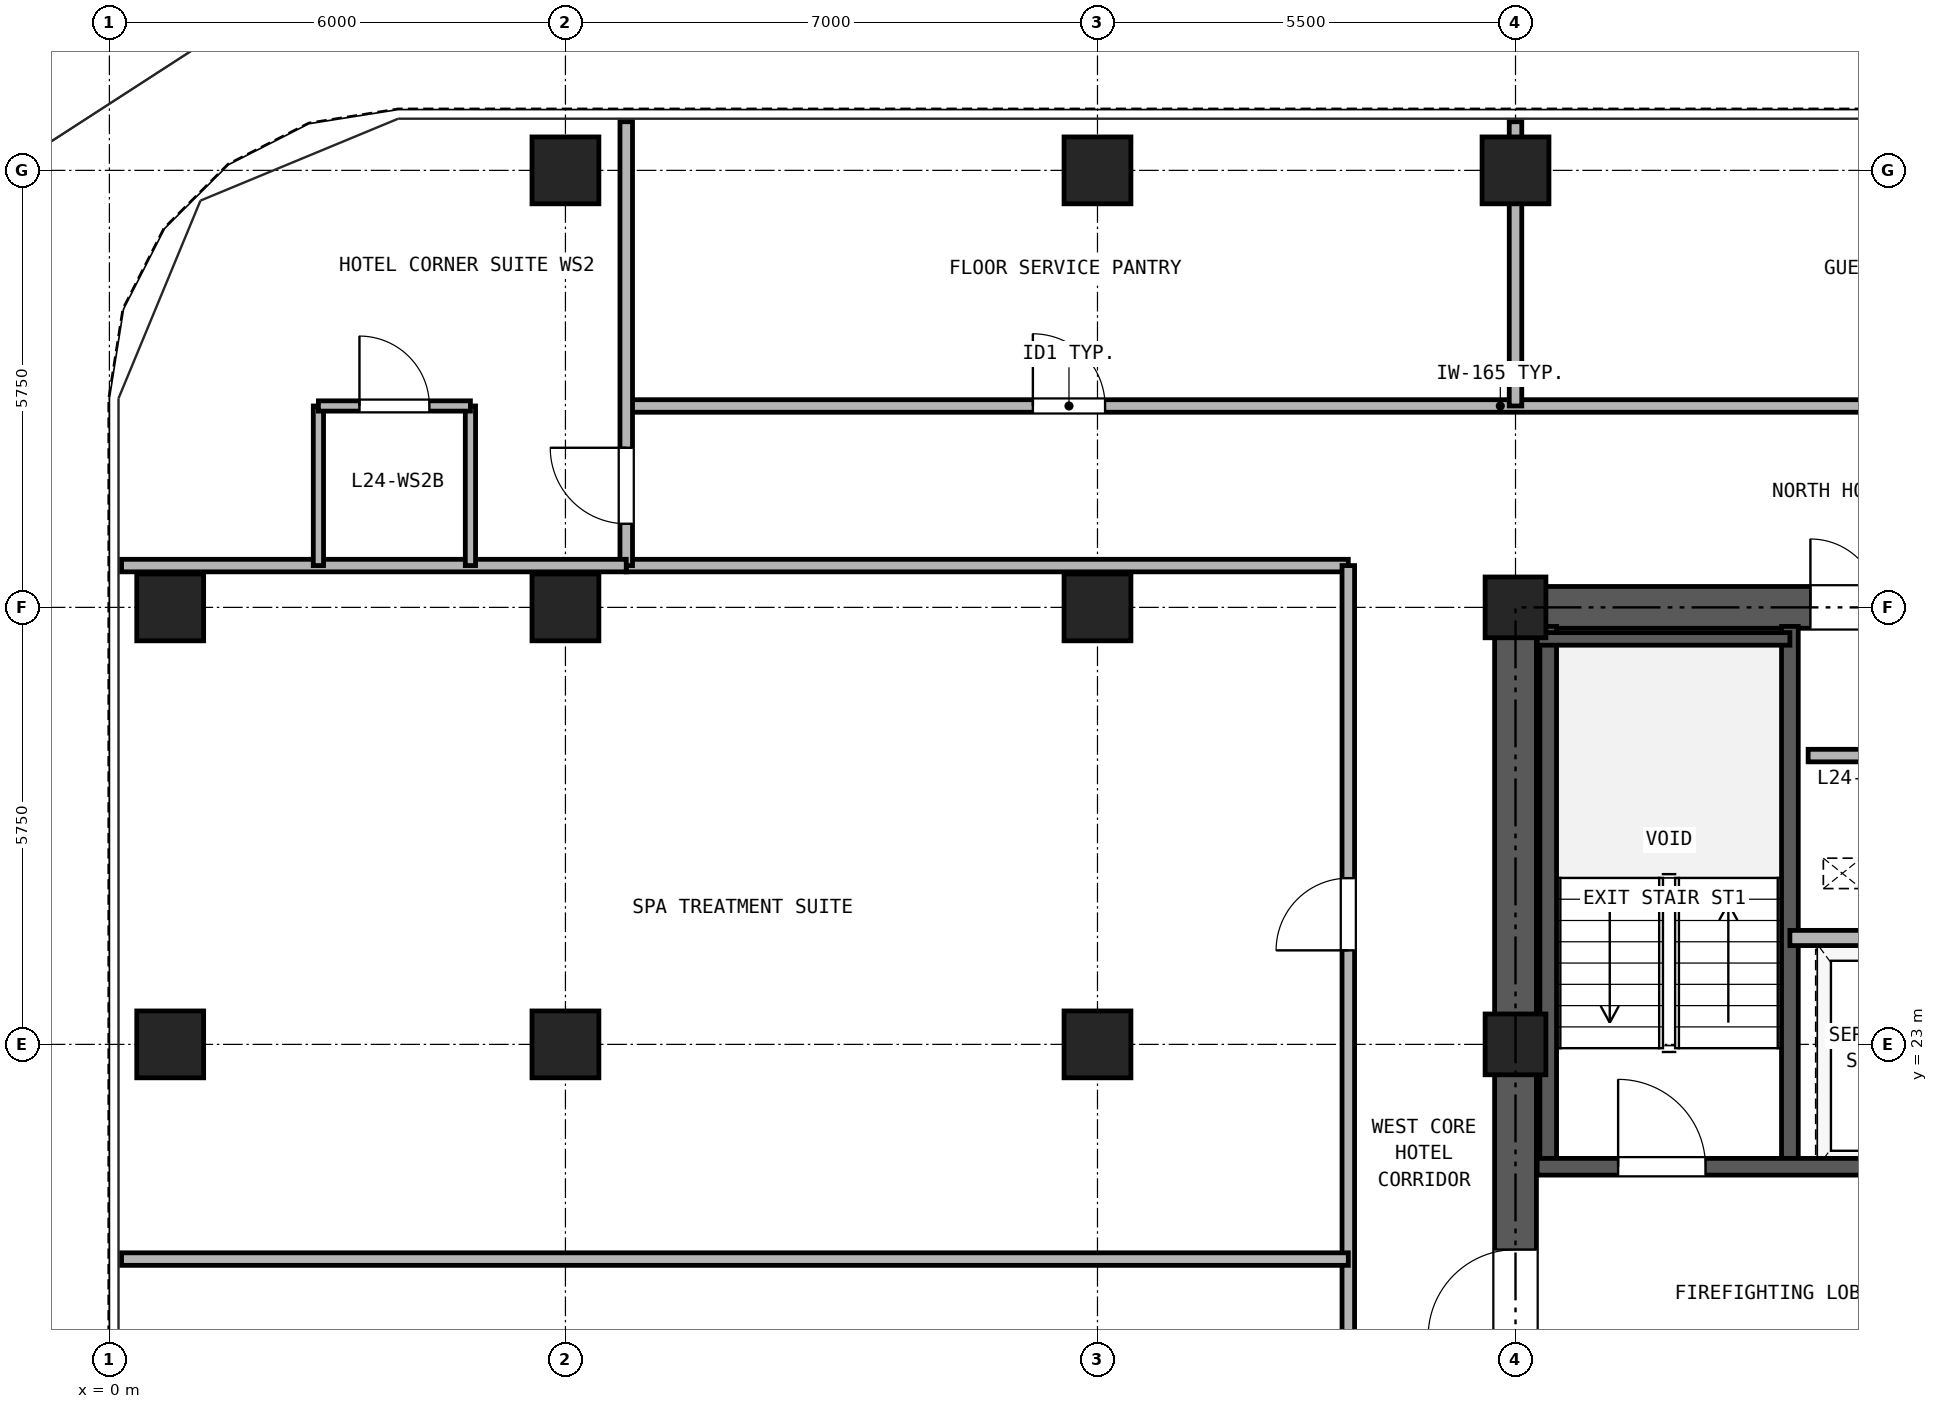
"""IFC4 building model, lengths in metres.
Left out: names, types, materials, properties, quantities, classifications, styles, units other than length and angle.
Written with IfcOpenShell. Run it as: python <this file> out.ifc"""

import sys

from ifc_helpers import new_model, si_unit, direction, frame, frame_2d, origin, origin_2d, place, context, subcontext, project, spatial, rectangle, hollow_rectangle, extrude, source, transform, mapped, element, fill, save


model = new_model("IFC4")
c1 = context("Model", 3, precision=1e-05, world=origin(), true_north=direction((0.0, 1.0)))
c2 = subcontext(c1, "Body", "Model", "MODEL_VIEW")
j1 = project(units=[si_unit("LENGTHUNIT", "METRE"), si_unit("PLANEANGLEUNIT", "RADIAN")], contexts=[c1])
p1 = place(None, origin())
s1 = spatial("IfcSite", under=j1, at=p1, CompositionType="ELEMENT")
p2 = place(p1, origin())
s2 = spatial("IfcBuilding", under=s1, at=p2, CompositionType="ELEMENT")
p3 = place(p2, frame((0.0, 0.0, 92.7)))
s3 = spatial("IfcBuildingStorey", under=s2, at=p3, CompositionType="ELEMENT", Elevation=92.7)
m1 = source(origin(), c2, "Body", "SweptSolid", [
    extrude(hollow_rectangle(XDim=0.88, YDim=0.88, WallThickness=0.05, at=origin_2d()), origin(), (0.0, 0.0, 1.0), 2.95),
])
for number, where, z_axis, x_axis in (
    (1, (6.0, 34.5, 0.0), (0.0, 0.0, 1.0), (1.0, 0.0, 0.0)),
    (2, (13.0, 34.5, 0.0), (0.0, 0.0, 1.0), (1.0, 0.0, 0.0)),
    (3, (18.5, 34.5, 0.0), (0.0, 0.0, 1.0), (1.0, 0.0, 0.0)),
    (4, (0.8, 23.0, 0.0), (0.0, 0.0, 1.0), (1.0, 0.0, 0.0)),
    (5, (0.8, 28.75, 0.0), (0.0, 0.0, 1.0), (1.0, 0.0, 0.0)),
    (6, (6.0, 23.0, 0.0), (0.0, 0.0, 1.0), (1.0, 0.0, 0.0)),
    (7, (6.0, 28.75, 0.0), (0.0, 0.0, 1.0), (1.0, 0.0, 0.0)),
    (8, (13.0, 23.0, 0.0), (0.0, 0.0, 1.0), (1.0, 0.0, 0.0)),
    (9, (13.0, 28.75, 0.0), (0.0, 0.0, 1.0), (1.0, 0.0, 0.0)),
):
    element("IfcColumn", number, at=place(p3, frame(where, z_axis=z_axis, x_axis=x_axis)), inside=s3, PredefinedType="COLUMN", context=c2, shape_type="MappedRepresentation", body=[
        mapped(m1, transform((0.0, 0.0, 0.0), x_axis=(1.0, 0.0, 0.0), y_axis=(0.0, 1.0, 0.0), z_axis=(0.0, 0.0, 1.0), scale=1.0)),
    ])
m2 = source(origin(), c2, "Body", "SweptSolid", [
    extrude(hollow_rectangle(XDim=0.8, YDim=0.8, WallThickness=0.045, at=origin_2d()), origin(), (0.0, 0.0, 1.0), 2.95),
])
for number, where, z_axis, x_axis in (
    (10, (18.5, 23.0, 0.0), (0.0, 0.0, 1.0), (1.0, 0.0, 0.0)),
    (11, (18.5, 28.75, 0.0), (0.0, 0.0, 1.0), (1.0, 0.0, 0.0)),
):
    element("IfcColumn", number, at=place(p3, frame(where, z_axis=z_axis, x_axis=x_axis)), inside=s3, PredefinedType="COLUMN", context=c2, shape_type="MappedRepresentation", body=[
        mapped(m2, transform((0.0, 0.0, 0.0), x_axis=(1.0, 0.0, 0.0), y_axis=(0.0, 1.0, 0.0), z_axis=(0.0, 0.0, 1.0), scale=1.0)),
    ])
p4 = place(p3, frame((18.225, 28.75, 0.0), z_axis=(0.0, 0.0, 1.0), x_axis=(1.0, 0.0, 0.0)))
e12 = element("IfcWall", 12, at=p4, inside=s3, PredefinedType="SHEAR", context=c2, shape_type="SweptSolid", body=[
    extrude(rectangle(XDim=10.55, YDim=0.55, at=frame_2d((5.275, 0.0))), origin(), (0.0, 0.0, 1.0), 2.95),
])
p5 = place(p4, frame((4.155, 0.0, 0.0)))
e13 = element("IfcOpeningElement", 13, at=p5, cuts=e12, PredefinedType="OPENING", context=c2, shape_type="SweptSolid", body=[
    extrude(rectangle(XDim=0.9, YDim=2.05, at=frame_2d((0.45, 1.025))), frame((0.0, 0.285, 0.0), z_axis=(0.0, -1.0, 0.0), x_axis=(1.0, 0.0, 0.0)), (0.0, 0.0, 1.0), 0.57),
])
p6 = place(p4, frame((5.695, 0.0, 0.0)))
e14 = element("IfcOpeningElement", 14, at=p6, cuts=e12, PredefinedType="OPENING", context=c2, shape_type="SweptSolid", body=[
    extrude(rectangle(XDim=0.9, YDim=2.05, at=frame_2d((0.45, 1.025))), frame((0.0, 0.285, 0.0), z_axis=(0.0, -1.0, 0.0), x_axis=(1.0, 0.0, 0.0)), (0.0, 0.0, 1.0), 0.57),
])
p7 = place(p3, frame((18.5, 11.775, 0.0), z_axis=(0.0, 0.0, 1.0), x_axis=(0.0, 1.0, 0.0)))
e15 = element("IfcWall", 15, at=p7, inside=s3, PredefinedType="SHEAR", context=c2, shape_type="SweptSolid", body=[
    extrude(rectangle(XDim=16.7, YDim=0.55, at=frame_2d((8.35, 0.0))), origin(), (0.0, 0.0, 1.0), 2.95),
])
p8 = place(p7, frame((7.375, 0.0, 0.0)))
e16 = element("IfcOpeningElement", 16, at=p8, cuts=e15, PredefinedType="OPENING", context=c2, shape_type="SweptSolid", body=[
    extrude(rectangle(XDim=1.15, YDim=2.2, at=frame_2d((0.575, 1.1))), frame((0.0, 0.285, 0.0), z_axis=(0.0, -1.0, 0.0), x_axis=(1.0, 0.0, 0.0)), (0.0, 0.0, 1.0), 0.57),
])
for number, where, z_axis, x_axis in (
    (17, (18.93, 21.39, 0.0), (0.0, 0.0, 1.0), (0.0, 1.0, 0.0)),
    (18, (22.11, 21.39, 0.0), (0.0, 0.0, 1.0), (0.0, 1.0, 0.0)),
):
    element("IfcWall", number, at=place(p3, frame(where, z_axis=z_axis, x_axis=x_axis)), inside=s3, PredefinedType="SOLIDWALL", context=c2, shape_type="SweptSolid", body=[
        extrude(rectangle(XDim=7.11, YDim=0.22, at=frame_2d((3.555, 0.0))), origin(), (0.0, 0.0, 1.0), 2.95),
    ])
p9 = place(p3, frame((18.785, 28.335, 0.0), z_axis=(0.0, 0.0, 1.0), x_axis=(1.0, 0.0, 0.0)))
e19 = element("IfcWall", 19, at=p9, inside=s3, PredefinedType="PARTITIONING", context=c2, shape_type="SweptSolid", body=[
    extrude(rectangle(XDim=3.325, YDim=0.165, at=frame_2d((1.663, 0.0))), origin(), (0.0, 0.0, 1.0), 2.95),
])
p10 = place(p3, frame((18.785, 21.39, 0.0), z_axis=(0.0, 0.0, 1.0), x_axis=(1.0, 0.0, 0.0)))
e20 = element("IfcWall", 20, at=p10, inside=s3, PredefinedType="SOLIDWALL", context=c2, shape_type="SweptSolid", body=[
    extrude(rectangle(XDim=6.345, YDim=0.22, at=frame_2d((3.172, 0.0))), origin(), (0.0, 0.0, 1.0), 2.95),
])
p11 = place(p10, frame((1.065, 0.0, 0.0)))
e21 = element("IfcOpeningElement", 21, at=p11, cuts=e20, PredefinedType="OPENING", context=c2, shape_type="SweptSolid", body=[
    extrude(rectangle(XDim=1.15, YDim=2.2, at=frame_2d((0.575, 1.1))), frame((0.0, 0.12, 0.0), z_axis=(0.0, -1.0, 0.0), x_axis=(1.0, 0.0, 0.0)), (0.0, 0.0, 1.0), 0.24),
])
p12 = place(p10, frame((4.795, 0.0, 0.0)))
e22 = element("IfcOpeningElement", 22, at=p12, cuts=e20, PredefinedType="OPENING", context=c2, shape_type="SweptSolid", body=[
    extrude(rectangle(XDim=1.1, YDim=2.25, at=frame_2d((0.55, 1.125))), frame((0.0, 0.12, 0.0), z_axis=(0.0, -1.0, 0.0), x_axis=(1.0, 0.0, 0.0)), (0.0, 0.0, 1.0), 0.24),
])
p13 = place(p3, frame((22.11, 24.4, 0.0), z_axis=(0.0, 0.0, 1.0), x_axis=(1.0, 0.0, 0.0)))
e23 = element("IfcWall", 23, at=p13, inside=s3, PredefinedType="PARTITIONING", context=c2, shape_type="SweptSolid", body=[
    extrude(rectangle(XDim=3.02, YDim=0.2, at=frame_2d((1.51, 0.0))), origin(), (0.0, 0.0, 1.0), 2.95),
])
p14 = place(p3, frame((6.8, 31.4, 0.0), z_axis=(0.0, 0.0, 1.0), x_axis=(1.0, 0.0, 0.0)))
e24 = element("IfcWall", 24, at=p14, inside=s3, PredefinedType="PARTITIONING", context=c2, shape_type="SweptSolid", body=[
    extrude(rectangle(XDim=33.4, YDim=0.165, at=frame_2d((16.7, 0.0))), origin(), (0.0, 0.0, 1.0), 2.583),
])
p15 = place(p14, frame((5.35, 0.0, 0.0)))
e25 = element("IfcOpeningElement", 25, at=p15, cuts=e24, PredefinedType="OPENING", context=c2, shape_type="SweptSolid", body=[
    extrude(rectangle(XDim=0.95, YDim=2.15, at=frame_2d((0.475, 1.075))), frame((0.0, 0.093, 0.0), z_axis=(0.0, -1.0, 0.0), x_axis=(1.0, 0.0, 0.0)), (0.0, 0.0, 1.0), 0.185),
])
p16 = place(p14, frame((16.7, 0.0, 0.0)))
e26 = element("IfcOpeningElement", 26, at=p16, cuts=e24, PredefinedType="OPENING", context=c2, shape_type="SweptSolid", body=[
    extrude(rectangle(XDim=0.95, YDim=2.15, at=frame_2d((0.475, 1.075))), frame((0.0, 0.093, 0.0), z_axis=(0.0, -1.0, 0.0), x_axis=(1.0, 0.0, 0.0)), (0.0, 0.0, 1.0), 0.185),
])
p17 = place(p14, frame((24.7, 0.0, 0.0)))
e27 = element("IfcOpeningElement", 27, at=p17, cuts=e24, PredefinedType="OPENING", context=c2, shape_type="SweptSolid", body=[
    extrude(rectangle(XDim=0.95, YDim=2.15, at=frame_2d((0.475, 1.075))), frame((0.0, 0.093, 0.0), z_axis=(0.0, -1.0, 0.0), x_axis=(1.0, 0.0, 0.0)), (0.0, 0.0, 1.0), 0.185),
])
p18 = place(p14, frame((30.05, 0.0, 0.0)))
e28 = element("IfcOpeningElement", 28, at=p18, cuts=e24, PredefinedType="OPENING", context=c2, shape_type="SweptSolid", body=[
    extrude(rectangle(XDim=0.92, YDim=2.1, at=frame_2d((0.46, 1.05))), frame((0.0, 0.093, 0.0), z_axis=(0.0, -1.0, 0.0), x_axis=(1.0, 0.0, 0.0)), (0.0, 0.0, 1.0), 0.185),
])
p19 = place(p3, frame((6.8, 29.3, 0.0), z_axis=(0.0, 0.0, 1.0), x_axis=(1.0, 0.0, 0.0)))
e29 = element("IfcWall", 29, at=p19, inside=s3, PredefinedType="PARTITIONING", context=c2, shape_type="SweptSolid", body=[
    extrude(rectangle(XDim=9.5, YDim=0.165, at=frame_2d((4.75, 0.0))), origin(), (0.0, 0.0, 1.0), 2.95),
])
p20 = place(p3, frame((16.3, 11.05, 0.0), z_axis=(0.0, 0.0, 1.0), x_axis=(0.0, 1.0, 0.0)))
e30 = element("IfcWall", 30, at=p20, inside=s3, PredefinedType="PARTITIONING", context=c2, shape_type="SweptSolid", body=[
    extrude(rectangle(XDim=18.25, YDim=0.165, at=frame_2d((9.125, 0.0))), origin(), (0.0, 0.0, 1.0), 2.95),
])
p21 = place(p20, frame((4.062, 0.0, 0.0)))
e31 = element("IfcOpeningElement", 31, at=p21, cuts=e30, PredefinedType="OPENING", context=c2, shape_type="SweptSolid", body=[
    extrude(rectangle(XDim=0.95, YDim=2.15, at=frame_2d((0.475, 1.075))), frame((0.0, 0.093, 0.0), z_axis=(0.0, -1.0, 0.0), x_axis=(1.0, 0.0, 0.0)), (0.0, 0.0, 1.0), 0.185),
])
p22 = place(p20, frame((13.187, 0.0, 0.0)))
e32 = element("IfcOpeningElement", 32, at=p22, cuts=e30, PredefinedType="OPENING", context=c2, shape_type="SweptSolid", body=[
    extrude(rectangle(XDim=0.95, YDim=2.15, at=frame_2d((0.475, 1.075))), frame((0.0, 0.093, 0.0), z_axis=(0.0, -1.0, 0.0), x_axis=(1.0, 0.0, 0.0)), (0.0, 0.0, 1.0), 0.185),
])
p23 = place(p3, frame((6.8, 29.3, 0.0), z_axis=(0.0, 0.0, 1.0), x_axis=(0.0, 1.0, 0.0)))
e33 = element("IfcWall", 33, at=p23, inside=s3, PredefinedType="PARTITIONING", context=c2, shape_type="SweptSolid", body=[
    extrude(rectangle(XDim=5.84, YDim=0.165, at=frame_2d((2.92, 0.0))), origin(), (0.0, 0.0, 1.0), 2.95),
])
p24 = place(p23, frame((0.55, 0.0, 0.0)))
e34 = element("IfcOpeningElement", 34, at=p24, cuts=e33, PredefinedType="OPENING", context=c2, shape_type="SweptSolid", body=[
    extrude(rectangle(XDim=1.0, YDim=2.15, at=frame_2d((0.5, 1.075))), frame((0.0, 0.093, 0.0), z_axis=(0.0, -1.0, 0.0), x_axis=(1.0, 0.0, 0.0)), (0.0, 0.0, 1.0), 0.185),
])
p25 = place(p3, frame((0.16, 29.3, 0.0), z_axis=(0.0, 0.0, 1.0), x_axis=(1.0, 0.0, 0.0)))
e35 = element("IfcWall", 35, at=p25, inside=s3, PredefinedType="PARTITIONING", context=c2, shape_type="SweptSolid", body=[
    extrude(rectangle(XDim=6.64, YDim=0.165, at=frame_2d((3.32, 0.0))), origin(), (0.0, 0.0, 1.0), 2.95),
])
for number, where, z_axis, x_axis in (
    (36, (2.75, 29.3, 0.0), (0.0, 0.0, 1.0), (0.0, 1.0, 0.0)),
    (37, (4.75, 29.3, 0.0), (0.0, 0.0, 1.0), (0.0, 1.0, 0.0)),
):
    element("IfcWall", number, at=place(p3, frame(where, z_axis=z_axis, x_axis=x_axis)), inside=s3, PredefinedType="PARTITIONING", context=c2, shape_type="SweptSolid", body=[
        extrude(rectangle(XDim=2.1, YDim=0.135, at=frame_2d((1.05, 0.0))), origin(), (0.0, 0.0, 1.0), 2.95),
    ])
p26 = place(p3, frame((2.75, 31.4, 0.0), z_axis=(0.0, 0.0, 1.0), x_axis=(1.0, 0.0, 0.0)))
e38 = element("IfcWall", 38, at=p26, inside=s3, PredefinedType="PARTITIONING", context=c2, shape_type="SweptSolid", body=[
    extrude(rectangle(XDim=2.0, YDim=0.135, at=frame_2d((1.0, 0.0))), origin(), (0.0, 0.0, 1.0), 2.95),
])
p27 = place(p26, frame((0.54, 0.0, 0.0)))
e39 = element("IfcOpeningElement", 39, at=p27, cuts=e38, PredefinedType="OPENING", context=c2, shape_type="SweptSolid", body=[
    extrude(rectangle(XDim=0.92, YDim=2.1, at=frame_2d((0.46, 1.05))), frame((0.0, 0.077, 0.0), z_axis=(0.0, -1.0, 0.0), x_axis=(1.0, 0.0, 0.0)), (0.0, 0.0, 1.0), 0.155),
])
p28 = place(p3, frame((18.5, 31.4, 0.0), z_axis=(0.0, 0.0, 1.0), x_axis=(0.0, 1.0, 0.0)))
e40 = element("IfcWall", 40, at=p28, inside=s3, PredefinedType="PARTITIONING", context=c2, shape_type="SweptSolid", body=[
    extrude(rectangle(XDim=3.74, YDim=0.165, at=frame_2d((1.87, 0.0))), origin(), (0.0, 0.0, 1.0), 2.247),
])
p29 = place(p3, frame((0.16, 20.175, 0.0), z_axis=(0.0, 0.0, 1.0), x_axis=(1.0, 0.0, 0.0)))
e41 = element("IfcWall", 41, at=p29, inside=s3, PredefinedType="PARTITIONING", context=c2, shape_type="SweptSolid", body=[
    extrude(rectangle(XDim=16.14, YDim=0.165, at=frame_2d((8.07, 0.0))), origin(), (0.0, 0.0, 1.0), 2.583),
])
p30 = place(p3, frame((22.35, 26.8, 0.0), z_axis=(0.0, 0.0, 1.0), x_axis=(1.0, 0.0, 0.0)))
e42 = element("IfcWall", 42, at=p30, inside=s3, PredefinedType="PARTITIONING", context=c2, shape_type="SweptSolid", body=[
    extrude(rectangle(XDim=1.1, YDim=0.165, at=frame_2d((0.55, 0.0))), origin(), (0.0, 0.0, 1.0), 2.95),
])
p31 = place(p11, frame((1.15, 0.0, 0.0), z_axis=(0.0, 0.0, 1.0), x_axis=(-1.0, 0.0, 0.0)))
e43 = element("IfcDoor", 43, at=p31, inside=s3, OperationType="SINGLE_SWING_LEFT", PredefinedType="DOOR", context=c2, shape_type="SweptSolid", body=[
    extrude(rectangle(XDim=1.15, YDim=2.2, at=frame_2d((0.575, 1.1))), frame((0.0, 0.025, 0.0), z_axis=(0.0, -1.0, 0.0), x_axis=(1.0, 0.0, 0.0)), (0.0, 0.0, 1.0), 0.05),
])
fill(e21, e43)
p32 = place(p8, frame((1.15, 0.0, 0.0), z_axis=(0.0, 0.0, 1.0), x_axis=(-1.0, 0.0, 0.0)))
e44 = element("IfcDoor", 44, at=p32, inside=s3, OperationType="SINGLE_SWING_LEFT", PredefinedType="DOOR", context=c2, shape_type="SweptSolid", body=[
    extrude(rectangle(XDim=1.15, YDim=2.2, at=frame_2d((0.575, 1.1))), frame((0.0, 0.025, 0.0), z_axis=(0.0, -1.0, 0.0), x_axis=(1.0, 0.0, 0.0)), (0.0, 0.0, 1.0), 0.05),
])
fill(e16, e44)
p33 = place(p5, origin())
e45 = element("IfcDoor", 45, at=p33, inside=s3, OperationType="SINGLE_SWING_LEFT", PredefinedType="DOOR", context=c2, shape_type="SweptSolid", body=[
    extrude(rectangle(XDim=0.9, YDim=2.05, at=frame_2d((0.45, 1.025))), frame((0.0, 0.025, 0.0), z_axis=(0.0, -1.0, 0.0), x_axis=(1.0, 0.0, 0.0)), (0.0, 0.0, 1.0), 0.05),
])
fill(e13, e45)
p34 = place(p27, frame((0.92, 0.0, 0.0), z_axis=(0.0, 0.0, 1.0), x_axis=(-1.0, 0.0, 0.0)))
e46 = element("IfcDoor", 46, at=p34, inside=s3, OperationType="SINGLE_SWING_LEFT", PredefinedType="DOOR", context=c2, shape_type="SweptSolid", body=[
    extrude(rectangle(XDim=0.92, YDim=2.1, at=frame_2d((0.46, 1.05))), frame((0.0, 0.025, 0.0), z_axis=(0.0, -1.0, 0.0), x_axis=(1.0, 0.0, 0.0)), (0.0, 0.0, 1.0), 0.05),
])
fill(e39, e46)
p35 = place(p24, origin())
e47 = element("IfcDoor", 47, at=p35, inside=s3, OperationType="SINGLE_SWING_RIGHT", PredefinedType="DOOR", context=c2, shape_type="SweptSolid", body=[
    extrude(rectangle(XDim=1.0, YDim=2.15, at=frame_2d((0.5, 1.075))), frame((0.0, 0.025, 0.0), z_axis=(0.0, -1.0, 0.0), x_axis=(1.0, 0.0, 0.0)), (0.0, 0.0, 1.0), 0.05),
])
fill(e34, e47)
p36 = place(p15, origin())
e48 = element("IfcDoor", 48, at=p36, inside=s3, OperationType="SINGLE_SWING_LEFT", PredefinedType="DOOR", context=c2, shape_type="SweptSolid", body=[
    extrude(rectangle(XDim=0.95, YDim=2.15, at=frame_2d((0.475, 1.075))), frame((0.0, 0.025, 0.0), z_axis=(0.0, -1.0, 0.0), x_axis=(1.0, 0.0, 0.0)), (0.0, 0.0, 1.0), 0.05),
])
fill(e25, e48)
p37 = place(p22, frame((0.95, 0.0, 0.0), z_axis=(0.0, 0.0, 1.0), x_axis=(-1.0, 0.0, 0.0)))
e49 = element("IfcDoor", 49, at=p37, inside=s3, OperationType="SINGLE_SWING_LEFT", PredefinedType="DOOR", context=c2, shape_type="SweptSolid", body=[
    extrude(rectangle(XDim=0.95, YDim=2.15, at=frame_2d((0.475, 1.075))), frame((0.0, 0.025, 0.0), z_axis=(0.0, -1.0, 0.0), x_axis=(1.0, 0.0, 0.0)), (0.0, 0.0, 1.0), 0.05),
])
fill(e32, e49)
save(model, sys.argv[1])
